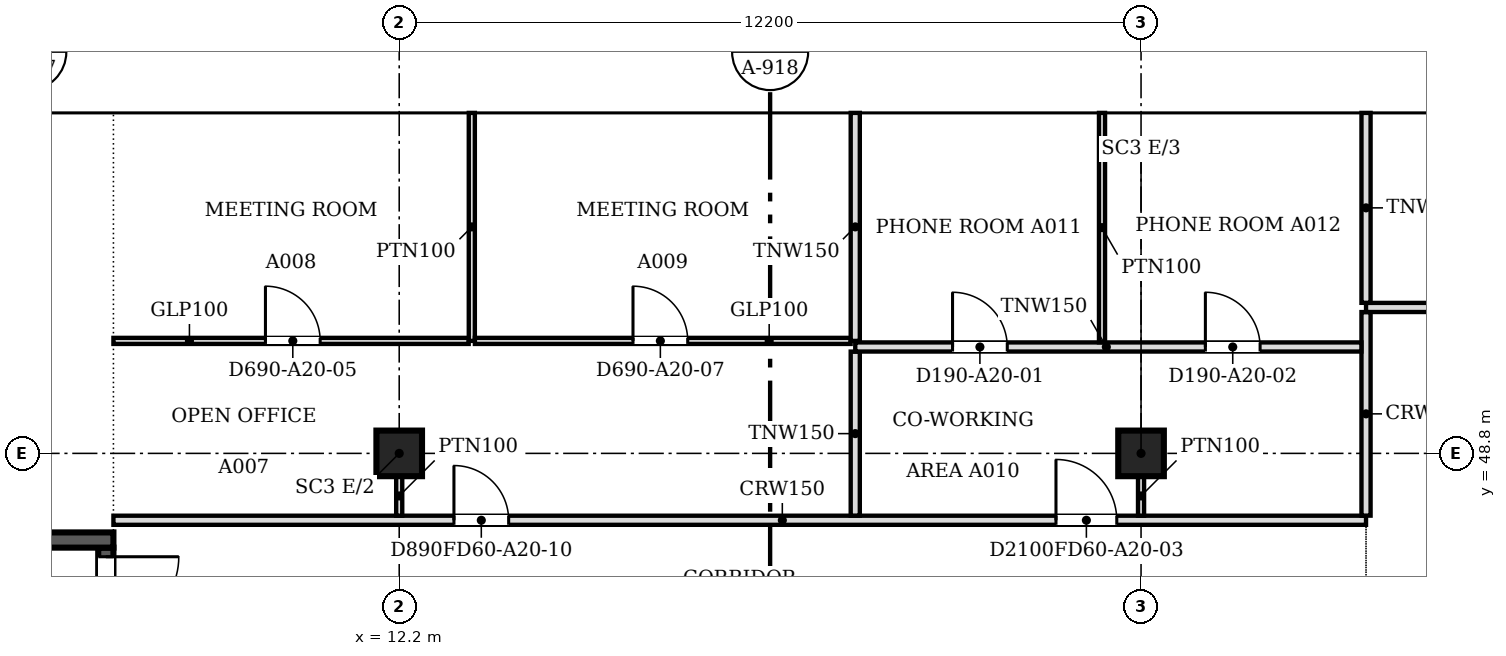
"""IFC4 building model, lengths in metres.
Left out: names, types, materials, properties, quantities, classifications, styles, units other than length and angle.
Written with IfcOpenShell. Run it as: python <this file> out.ifc"""

import sys

from ifc_helpers import new_model, si_unit, direction, frame, frame_2d, origin, origin_2d, place, context, subcontext, project, spatial, polyline, rectangle, outline, extrude, faceted_brep, source, transform, mapped, element, fill, save


model = new_model("IFC4")
c1 = context("Model", 3, precision=1e-05, world=origin(), true_north=direction((0.0, 1.0)))
c2 = subcontext(c1, "Body", "Model", "MODEL_VIEW")
j1 = project(units=[si_unit("LENGTHUNIT", "METRE"), si_unit("PLANEANGLEUNIT", "RADIAN")], contexts=[c1])
p1 = place(None, origin())
s1 = spatial("IfcSite", under=j1, at=p1, CompositionType="ELEMENT")
p2 = place(p1, origin())
s2 = spatial("IfcBuilding", under=s1, at=p2, CompositionType="ELEMENT")
p3 = place(p2, frame((0.0, 0.0, 220.7)))
s3 = spatial("IfcBuildingStorey", under=s2, at=p3, CompositionType="ELEMENT", Elevation=220.7)
for number, where, z_axis, x_axis in (
    (1, (12.2, 48.8, 0.0), (0.0, 0.0, 1.0), (1.0, 0.0, 0.0)),
    (2, (24.4, 48.8, 0.0), (0.0, 0.0, 1.0), (1.0, 0.0, 0.0)),
):
    element("IfcColumn", number, at=place(p3, frame(where, z_axis=z_axis, x_axis=x_axis)), inside=s3, PredefinedType="COLUMN", context=c2, shape_type="SweptSolid", body=[
        extrude(rectangle(XDim=0.75, YDim=0.75, at=origin_2d()), origin(), (0.0, 0.0, 1.0), 3.6),
    ])
m1 = source(origin(), c2, "Body", "SweptSolid", [
    extrude(outline(polyline([(3.05, 0.0), (6.1, 3.8), (3.05, 7.6), (0.0, 3.8), (3.05, 0.0)])), frame((0.0, 0.25, 0.0), z_axis=(0.0, -1.0, 0.0), x_axis=(1.0, 0.0, 0.0)), (0.0, 0.0, 1.0), 0.5),
])
p4 = place(p3, frame((33.55, 54.65, -3.8), z_axis=(0.0, 0.0, 1.0), x_axis=(-1.0, 0.0, 0.0)))
e3 = element("IfcWall", 3, at=p4, inside=s3, PredefinedType="SOLIDWALL", context=c2, shape_type="MappedRepresentation", body=[
    mapped(m1, transform((0.0, 0.0, 0.0), scale=1.0)),
])
m2 = source(origin(), c2, "Body", "SweptSolid", [
    extrude(outline(polyline([(3.05, 0.399), (5.78, 3.8), (3.05, 7.201), (0.321, 3.8), (3.05, 0.399)])), frame((0.0, 0.26, 0.0), z_axis=(0.0, -1.0, 0.0), x_axis=(1.0, 0.0, 0.0)), (0.0, 0.0, 1.0), 0.52),
])
p5 = place(p4, origin())
e4 = element("IfcOpeningElement", 4, at=p5, cuts=e3, PredefinedType="OPENING", context=c2, shape_type="MappedRepresentation", body=[
    mapped(m2, transform((0.0, 0.0, 0.0), scale=1.0)),
])
m3 = source(origin(), c2, "Body", "Brep", [
    faceted_brep([(3.05, -0.25, 0.0), (6.1, -0.25, 3.8), (6.1, -0.25, 3.8), (3.05, -0.25, 7.6), (0.0, -0.25, 3.8), (0.0, 0.25, 3.8), (3.05, 0.25, 7.6), (6.1, 0.25, 3.8), (6.1, 0.25, 3.8), (3.05, 0.25, 0.0)], [[[0, 1, 2, 3, 4]], [[5, 6, 7, 8, 9]], [[9, 8, 1, 0]], [[7, 6, 3, 2]], [[6, 5, 4, 3]], [[5, 9, 0, 4]], [[1, 8, 7, 2]]]),
])
p6 = place(p3, frame((27.45, 54.65, -3.8), z_axis=(0.0, 0.0, 1.0), x_axis=(-1.0, 0.0, 0.0)))
e5 = element("IfcWall", 5, at=p6, inside=s3, PredefinedType="SOLIDWALL", context=c2, shape_type="MappedRepresentation", body=[
    mapped(m3, transform((0.0, 0.0, 0.0), scale=1.0)),
])
p7 = place(p6, origin())
e6 = element("IfcOpeningElement", 6, at=p7, cuts=e5, PredefinedType="OPENING", context=c2, shape_type="MappedRepresentation", body=[
    mapped(m2, transform((0.0, 0.0, 0.0), scale=1.0)),
])
p8 = place(p3, frame((21.35, 54.65, -3.8), z_axis=(0.0, 0.0, 1.0), x_axis=(-1.0, 0.0, 0.0)))
e7 = element("IfcWall", 7, at=p8, inside=s3, PredefinedType="SOLIDWALL", context=c2, shape_type="MappedRepresentation", body=[
    mapped(m1, transform((0.0, 0.0, 0.0), scale=1.0)),
])
p9 = place(p8, origin())
e8 = element("IfcOpeningElement", 8, at=p9, cuts=e7, PredefinedType="OPENING", context=c2, shape_type="MappedRepresentation", body=[
    mapped(m2, transform((0.0, 0.0, 0.0), scale=1.0)),
])
p10 = place(p3, frame((15.25, 54.65, -3.8), z_axis=(0.0, 0.0, 1.0), x_axis=(-1.0, 0.0, 0.0)))
e9 = element("IfcWall", 9, at=p10, inside=s3, PredefinedType="SOLIDWALL", context=c2, shape_type="MappedRepresentation", body=[
    mapped(m1, transform((0.0, 0.0, 0.0), scale=1.0)),
])
p11 = place(p10, origin())
e10 = element("IfcOpeningElement", 10, at=p11, cuts=e9, PredefinedType="OPENING", context=c2, shape_type="MappedRepresentation", body=[
    mapped(m2, transform((0.0, 0.0, 0.0), scale=1.0)),
])
m4 = source(origin(), c2, "Body", "Brep", [
    faceted_brep([(3.003, -0.25, 0.0), (3.05, -0.25, 0.06), (3.05, -0.25, 7.54), (3.003, -0.25, 7.6), (0.0, -0.25, 3.8), (0.0, 0.25, 3.8), (2.957, 0.25, 7.541), (2.957, 0.25, 0.059), (3.003, 0.0, 0.0), (3.003, 0.0, 7.6)], [[[0, 1, 2, 3, 4]], [[5, 6, 7]], [[1, 0, 8]], [[9, 3, 2]], [[6, 5, 4, 3, 9]], [[5, 7, 8, 0, 4]], [[1, 8, 7, 6, 9, 2]]]),
])
p12 = place(p3, frame((9.15, 54.65, -3.8), z_axis=(0.0, 0.0, 1.0), x_axis=(-1.0, 0.0, 0.0)))
e11 = element("IfcWall", 11, at=p12, inside=s3, PredefinedType="SOLIDWALL", context=c2, shape_type="MappedRepresentation", body=[
    mapped(m4, transform((0.0, 0.0, 0.0), scale=1.0)),
])
m5 = source(origin(), c2, "Body", "SweptSolid", [
    extrude(outline(polyline([(2.803, 6.944), (0.319, 3.8), (2.803, 0.656), (2.803, 6.944)])), frame((0.0, 0.26, 0.0), z_axis=(0.0, -1.0, 0.0), x_axis=(1.0, 0.0, 0.0)), (0.0, 0.0, 1.0), 0.52),
])
p13 = place(p12, origin())
e12 = element("IfcOpeningElement", 12, at=p13, cuts=e11, PredefinedType="OPENING", context=c2, shape_type="MappedRepresentation", body=[
    mapped(m5, transform((0.0, 0.0, 0.0), scale=1.0)),
])
p14 = place(p2, frame((0.0, 0.0, 224.5)))
s4 = spatial("IfcBuildingStorey", under=s2, at=p14, CompositionType="ELEMENT", Elevation=224.5)
p15 = place(p14, frame((30.5, 54.65, -3.8), z_axis=(0.0, 0.0, 1.0), x_axis=(-1.0, 0.0, 0.0)))
e13 = element("IfcWall", 13, at=p15, inside=s4, PredefinedType="SOLIDWALL", context=c2, shape_type="MappedRepresentation", body=[
    mapped(m1, transform((0.0, 0.0, 0.0), scale=1.0)),
])
p16 = place(p15, origin())
e14 = element("IfcOpeningElement", 14, at=p16, cuts=e13, PredefinedType="OPENING", context=c2, shape_type="MappedRepresentation", body=[
    mapped(m2, transform((0.0, 0.0, 0.0), scale=1.0)),
])
p17 = place(p14, frame((24.4, 54.65, -3.8), z_axis=(0.0, 0.0, 1.0), x_axis=(-1.0, 0.0, 0.0)))
e15 = element("IfcWall", 15, at=p17, inside=s4, PredefinedType="SOLIDWALL", context=c2, shape_type="MappedRepresentation", body=[
    mapped(m3, transform((0.0, 0.0, 0.0), scale=1.0)),
])
p18 = place(p17, origin())
e16 = element("IfcOpeningElement", 16, at=p18, cuts=e15, PredefinedType="OPENING", context=c2, shape_type="MappedRepresentation", body=[
    mapped(m2, transform((0.0, 0.0, 0.0), scale=1.0)),
])
p19 = place(p14, frame((18.3, 54.65, -3.8), z_axis=(0.0, 0.0, 1.0), x_axis=(-1.0, 0.0, 0.0)))
e17 = element("IfcWall", 17, at=p19, inside=s4, PredefinedType="SOLIDWALL", context=c2, shape_type="MappedRepresentation", body=[
    mapped(m1, transform((0.0, 0.0, 0.0), scale=1.0)),
])
p20 = place(p19, origin())
e18 = element("IfcOpeningElement", 18, at=p20, cuts=e17, PredefinedType="OPENING", context=c2, shape_type="MappedRepresentation", body=[
    mapped(m2, transform((0.0, 0.0, 0.0), scale=1.0)),
])
m6 = source(origin(), c2, "Body", "Brep", [
    faceted_brep([(3.05, -0.25, 0.0), (6.053, -0.25, 3.8), (3.05, -0.25, 7.6), (0.0, -0.25, 3.8), (0.0, 0.25, 3.8), (3.05, 0.25, 7.6), (6.007, 0.25, 3.859), (6.007, 0.25, 3.741), (3.05, 0.25, 0.0), (6.053, 0.0, 3.8)], [[[0, 1, 2, 3]], [[4, 5, 6, 7, 8]], [[8, 7, 9, 1, 0]], [[6, 5, 2, 1, 9]], [[5, 4, 3, 2]], [[4, 8, 0, 3]], [[9, 7, 6]]]),
])
p21 = place(p14, frame((12.2, 54.65, -3.8), z_axis=(0.0, 0.0, 1.0), x_axis=(-1.0, 0.0, 0.0)))
e19 = element("IfcWall", 19, at=p21, inside=s4, PredefinedType="SOLIDWALL", context=c2, shape_type="MappedRepresentation", body=[
    mapped(m6, transform((0.0, 0.0, 0.0), scale=1.0)),
])
m7 = source(origin(), c2, "Body", "SweptSolid", [
    extrude(outline(polyline([(3.049, 0.401), (5.735, 3.8), (3.049, 7.199), (0.321, 3.8), (3.049, 0.401)])), frame((0.0, 0.26, 0.0), z_axis=(0.0, -1.0, 0.0), x_axis=(1.0, 0.0, 0.0)), (0.0, 0.0, 1.0), 0.52),
])
p22 = place(p21, origin())
e20 = element("IfcOpeningElement", 20, at=p22, cuts=e19, PredefinedType="OPENING", context=c2, shape_type="MappedRepresentation", body=[
    mapped(m7, transform((0.0, 0.0, 0.0), scale=1.0)),
])
p23 = place(p3, frame((3.6, 47.375, 0.0), z_axis=(0.0, 0.0, 1.0), x_axis=(1.0, 0.0, 0.0)))
e21 = element("IfcWall", 21, at=p23, inside=s3, PredefinedType="SOLIDWALL", context=c2, shape_type="SweptSolid", body=[
    extrude(rectangle(XDim=3.9, YDim=0.25, at=frame_2d((1.95, 0.0))), origin(), (0.0, 0.0, 1.0), 3.8),
])
p24 = place(p3, frame((7.375, 47.25, 0.0), z_axis=(0.0, 0.0, 1.0), x_axis=(0.0, -1.0, 0.0)))
e22 = element("IfcWall", 22, at=p24, inside=s3, PredefinedType="SOLIDWALL", context=c2, shape_type="SweptSolid", body=[
    extrude(rectangle(XDim=8.0, YDim=0.25, at=frame_2d((4.0, 0.0))), origin(), (0.0, 0.0, 1.0), 3.8),
])
m8 = source(origin(), c2, "Body", "SweptSolid", [
    extrude(rectangle(XDim=1.2, YDim=2.1, at=frame_2d((0.6, 1.05))), frame((0.0, 0.135, 0.0), z_axis=(0.0, -1.0, 0.0), x_axis=(1.0, 0.0, 0.0)), (0.0, 0.0, 1.0), 0.27),
])
p25 = place(p24, frame((0.15, 0.0, 0.0)))
e23 = element("IfcOpeningElement", 23, at=p25, cuts=e22, PredefinedType="OPENING", context=c2, shape_type="MappedRepresentation", body=[
    mapped(m8, transform((0.0, 0.0, 0.0), scale=1.0)),
])
p26 = place(p3, frame((7.5, 47.7, 0.0), z_axis=(0.0, 0.0, 1.0), x_axis=(1.0, 0.0, 0.0)))
e24 = element("IfcWall", 24, at=p26, inside=s3, PredefinedType="PARTITIONING", context=c2, shape_type="SweptSolid", body=[
    extrude(rectangle(XDim=20.6, YDim=0.15, at=frame_2d((10.3, 0.0))), origin(), (0.0, 0.0, 1.0), 3.067),
])
m9 = source(origin(), c2, "Body", "SweptSolid", [
    extrude(rectangle(XDim=1.0, YDim=2.1, at=frame_2d((0.5, 1.05))), frame((0.0, 0.085, 0.0), z_axis=(0.0, -1.0, 0.0), x_axis=(1.0, 0.0, 0.0)), (0.0, 0.0, 1.0), 0.17),
])
p27 = place(p26, frame((15.501, 0.0, 0.0)))
e25 = element("IfcOpeningElement", 25, at=p27, cuts=e24, PredefinedType="OPENING", context=c2, shape_type="MappedRepresentation", body=[
    mapped(m9, transform((0.0, 0.0, 0.0), scale=1.0)),
])
m10 = source(origin(), c2, "Body", "SweptSolid", [
    extrude(rectangle(XDim=0.9, YDim=2.1, at=frame_2d((0.45, 1.05))), frame((0.0, 0.085, 0.0), z_axis=(0.0, -1.0, 0.0), x_axis=(1.0, 0.0, 0.0)), (0.0, 0.0, 1.0), 0.17),
])
p28 = place(p26, frame((5.6, 0.0, 0.0)))
e26 = element("IfcOpeningElement", 26, at=p28, cuts=e24, PredefinedType="OPENING", context=c2, shape_type="MappedRepresentation", body=[
    mapped(m10, transform((0.0, 0.0, 0.0), scale=1.0)),
])
p29 = place(p3, frame((19.7, 47.776, 0.0), z_axis=(0.0, 0.0, 1.0), x_axis=(0.0, 1.0, 0.0)))
e27 = element("IfcWall", 27, at=p29, inside=s3, PredefinedType="PARTITIONING", context=c2, shape_type="SweptSolid", body=[
    extrude(rectangle(XDim=2.698, YDim=0.15, at=frame_2d((1.349, 0.0))), origin(), (0.0, 0.0, 1.0), 3.067),
])
p30 = place(p3, frame((28.1, 47.776, 0.0), z_axis=(0.0, 0.0, 1.0), x_axis=(0.0, 1.0, 0.0)))
e28 = element("IfcWall", 28, at=p30, inside=s3, PredefinedType="PARTITIONING", context=c2, shape_type="SweptSolid", body=[
    extrude(rectangle(XDim=3.348, YDim=0.15, at=frame_2d((1.674, 0.0))), origin(), (0.0, 0.0, 1.0), 3.067),
])
for number, where, z_axis, x_axis in (
    (29, (12.2, 48.425, 0.0), (0.0, 0.0, 1.0), (0.0, -1.0, 0.0)),
    (30, (24.4, 48.425, 0.0), (0.0, 0.0, 1.0), (0.0, -1.0, 0.0)),
):
    element("IfcWall", number, at=place(p3, frame(where, z_axis=z_axis, x_axis=x_axis)), inside=s3, PredefinedType="PARTITIONING", context=c2, shape_type="SweptSolid", body=[
        extrude(rectangle(XDim=0.65, YDim=0.1, at=frame_2d((0.325, 0.0))), origin(), (0.0, 0.0, 1.0), 3.067),
    ])
p31 = place(p3, frame((19.7, 50.55, 0.0), z_axis=(0.0, 0.0, 1.0), x_axis=(1.0, 0.0, 0.0)))
e31 = element("IfcWall", 31, at=p31, inside=s3, PredefinedType="PARTITIONING", context=c2, shape_type="SweptSolid", body=[
    extrude(rectangle(XDim=8.324, YDim=0.15, at=frame_2d((4.162, 0.0))), origin(), (0.0, 0.0, 1.0), 3.067),
])
p32 = place(p31, frame((1.6, 0.0, 0.0)))
e32 = element("IfcOpeningElement", 32, at=p32, cuts=e31, PredefinedType="OPENING", context=c2, shape_type="MappedRepresentation", body=[
    mapped(m10, transform((0.0, 0.0, 0.0), scale=1.0)),
])
p33 = place(p31, frame((5.758, 0.0, 0.0)))
e33 = element("IfcOpeningElement", 33, at=p33, cuts=e31, PredefinedType="OPENING", context=c2, shape_type="MappedRepresentation", body=[
    mapped(m10, transform((0.0, 0.0, 0.0), scale=1.0)),
])
p34 = place(p3, frame((23.758, 50.626, 0.0), z_axis=(0.0, 0.0, 1.0), x_axis=(0.0, 1.0, 0.0)))
e34 = element("IfcWall", 34, at=p34, inside=s3, PredefinedType="PARTITIONING", context=c2, shape_type="SweptSolid", body=[
    extrude(rectangle(XDim=3.774, YDim=0.1, at=frame_2d((1.887, 0.0))), origin(), (0.0, 0.0, 1.0), 3.067),
])
p35 = place(p3, frame((7.5, 50.65, 0.0), z_axis=(0.0, 0.0, 1.0), x_axis=(1.0, 0.0, 0.0)))
e35 = element("IfcWall", 35, at=p35, inside=s3, PredefinedType="PARTITIONING", context=c2, shape_type="SweptSolid", body=[
    extrude(rectangle(XDim=5.843, YDim=0.1, at=frame_2d((2.921, 0.0))), origin(), (0.0, 0.0, 1.0), 3.067),
])
m11 = source(origin(), c2, "Body", "SweptSolid", [
    extrude(rectangle(XDim=0.9, YDim=2.1, at=frame_2d((0.45, 1.05))), frame((0.0, 0.06, 0.0), z_axis=(0.0, -1.0, 0.0), x_axis=(1.0, 0.0, 0.0)), (0.0, 0.0, 1.0), 0.12),
])
p36 = place(p35, frame((2.5, 0.0, 0.0)))
e36 = element("IfcOpeningElement", 36, at=p36, cuts=e35, PredefinedType="OPENING", context=c2, shape_type="MappedRepresentation", body=[
    mapped(m11, transform((0.0, 0.0, 0.0), scale=1.0)),
])
p37 = place(p3, frame((13.394, 50.65, 0.0), z_axis=(0.0, 0.0, 1.0), x_axis=(0.0, 1.0, 0.0)))
e37 = element("IfcWall", 37, at=p37, inside=s3, PredefinedType="PARTITIONING", context=c2, shape_type="SweptSolid", body=[
    extrude(rectangle(XDim=3.75, YDim=0.1, at=frame_2d((1.875, 0.0))), origin(), (0.0, 0.0, 1.0), 3.067),
])
p38 = place(p3, frame((13.445, 50.65, 0.0), z_axis=(0.0, 0.0, 1.0), x_axis=(1.0, 0.0, 0.0)))
e38 = element("IfcWall", 38, at=p38, inside=s3, PredefinedType="PARTITIONING", context=c2, shape_type="SweptSolid", body=[
    extrude(rectangle(XDim=6.179, YDim=0.1, at=frame_2d((3.09, 0.0))), origin(), (0.0, 0.0, 1.0), 3.067),
])
p39 = place(p38, frame((2.6, 0.0, 0.0)))
e39 = element("IfcOpeningElement", 39, at=p39, cuts=e38, PredefinedType="OPENING", context=c2, shape_type="MappedRepresentation", body=[
    mapped(m11, transform((0.0, 0.0, 0.0), scale=1.0)),
])
p40 = place(p3, frame((19.7, 50.65, 0.0), z_axis=(0.0, 0.0, 1.0), x_axis=(0.0, 1.0, 0.0)))
e40 = element("IfcWall", 40, at=p40, inside=s3, PredefinedType="PARTITIONING", context=c2, shape_type="SweptSolid", body=[
    extrude(rectangle(XDim=3.75, YDim=0.15, at=frame_2d((1.875, 0.0))), origin(), (0.0, 0.0, 1.0), 3.067),
])
p41 = place(p3, frame((28.1, 51.2, 0.0), z_axis=(0.0, 0.0, 1.0), x_axis=(1.0, 0.0, 0.0)))
e41 = element("IfcWall", 41, at=p41, inside=s3, PredefinedType="PARTITIONING", context=c2, shape_type="SweptSolid", body=[
    extrude(rectangle(XDim=31.438, YDim=0.15, at=frame_2d((15.719, 0.0))), origin(), (0.0, 0.0, 1.0), 3.067),
])
p42 = place(p41, frame((27.501, 0.0, 0.0)))
e42 = element("IfcOpeningElement", 42, at=p42, cuts=e41, PredefinedType="OPENING", context=c2, shape_type="MappedRepresentation", body=[
    mapped(m10, transform((0.0, 0.0, 0.0), scale=1.0)),
])
p43 = place(p41, frame((5.6, 0.0, 0.0)))
e43 = element("IfcOpeningElement", 43, at=p43, cuts=e41, PredefinedType="OPENING", context=c2, shape_type="MappedRepresentation", body=[
    mapped(m10, transform((0.0, 0.0, 0.0), scale=1.0)),
])
p44 = place(p41, frame((17.8, 0.0, 0.0)))
e44 = element("IfcOpeningElement", 44, at=p44, cuts=e41, PredefinedType="OPENING", context=c2, shape_type="MappedRepresentation", body=[
    mapped(m10, transform((0.0, 0.0, 0.0), scale=1.0)),
])
p45 = place(p3, frame((28.1, 51.276, 0.0), z_axis=(0.0, 0.0, 1.0), x_axis=(0.0, 1.0, 0.0)))
e45 = element("IfcWall", 45, at=p45, inside=s3, PredefinedType="PARTITIONING", context=c2, shape_type="SweptSolid", body=[
    extrude(rectangle(XDim=3.124, YDim=0.15, at=frame_2d((1.562, 0.0))), origin(), (0.0, 0.0, 1.0), 3.067),
])
m12 = source(origin(), c2, "Body", "SweptSolid", [
    extrude(rectangle(XDim=1.2, YDim=2.1, at=frame_2d((0.6, 1.05))), frame((0.0, 0.025, 0.0), z_axis=(0.0, -1.0, 0.0), x_axis=(1.0, 0.0, 0.0)), (0.0, 0.0, 1.0), 0.05),
])
p46 = place(p25, origin())
e46 = element("IfcDoor", 46, at=p46, inside=s3, OperationType="SINGLE_SWING_LEFT", PredefinedType="DOOR", context=c2, shape_type="MappedRepresentation", body=[
    mapped(m12, transform((0.0, 0.0, 0.0), scale=1.0)),
])
fill(e23, e46)
m13 = source(origin(), c2, "Body", "SweptSolid", [
    extrude(rectangle(XDim=0.9, YDim=2.1, at=frame_2d((0.45, 1.05))), frame((0.0, 0.025, 0.0), z_axis=(0.0, -1.0, 0.0), x_axis=(1.0, 0.0, 0.0)), (0.0, 0.0, 1.0), 0.05),
])
p47 = place(p32, origin())
e47 = element("IfcDoor", 47, at=p47, inside=s3, OperationType="SINGLE_SWING_LEFT", PredefinedType="DOOR", context=c2, shape_type="MappedRepresentation", body=[
    mapped(m13, transform((0.0, 0.0, 0.0), scale=1.0)),
])
fill(e32, e47)
p48 = place(p33, origin())
e48 = element("IfcDoor", 48, at=p48, inside=s3, OperationType="SINGLE_SWING_LEFT", PredefinedType="DOOR", context=c2, shape_type="MappedRepresentation", body=[
    mapped(m13, transform((0.0, 0.0, 0.0), scale=1.0)),
])
fill(e33, e48)
p49 = place(p36, origin())
e49 = element("IfcDoor", 49, at=p49, inside=s3, OperationType="SINGLE_SWING_LEFT", PredefinedType="DOOR", context=c2, shape_type="MappedRepresentation", body=[
    mapped(m13, transform((0.0, 0.0, 0.0), scale=1.0)),
])
fill(e36, e49)
p50 = place(p39, origin())
e50 = element("IfcDoor", 50, at=p50, inside=s3, OperationType="SINGLE_SWING_LEFT", PredefinedType="DOOR", context=c2, shape_type="MappedRepresentation", body=[
    mapped(m13, transform((0.0, 0.0, 0.0), scale=1.0)),
])
fill(e39, e50)
m14 = source(origin(), c2, "Body", "SweptSolid", [
    extrude(rectangle(XDim=1.0, YDim=2.1, at=frame_2d((0.5, 1.05))), frame((0.0, 0.025, 0.0), z_axis=(0.0, -1.0, 0.0), x_axis=(1.0, 0.0, 0.0)), (0.0, 0.0, 1.0), 0.05),
])
p51 = place(p27, origin())
e51 = element("IfcDoor", 51, at=p51, inside=s3, OperationType="SINGLE_SWING_LEFT", PredefinedType="DOOR", context=c2, shape_type="MappedRepresentation", body=[
    mapped(m14, transform((0.0, 0.0, 0.0), scale=1.0)),
])
fill(e25, e51)
p52 = place(p28, origin())
e52 = element("IfcDoor", 52, at=p52, inside=s3, OperationType="SINGLE_SWING_LEFT", PredefinedType="DOOR", context=c2, shape_type="MappedRepresentation", body=[
    mapped(m13, transform((0.0, 0.0, 0.0), scale=1.0)),
])
fill(e26, e52)
save(model, sys.argv[1])
